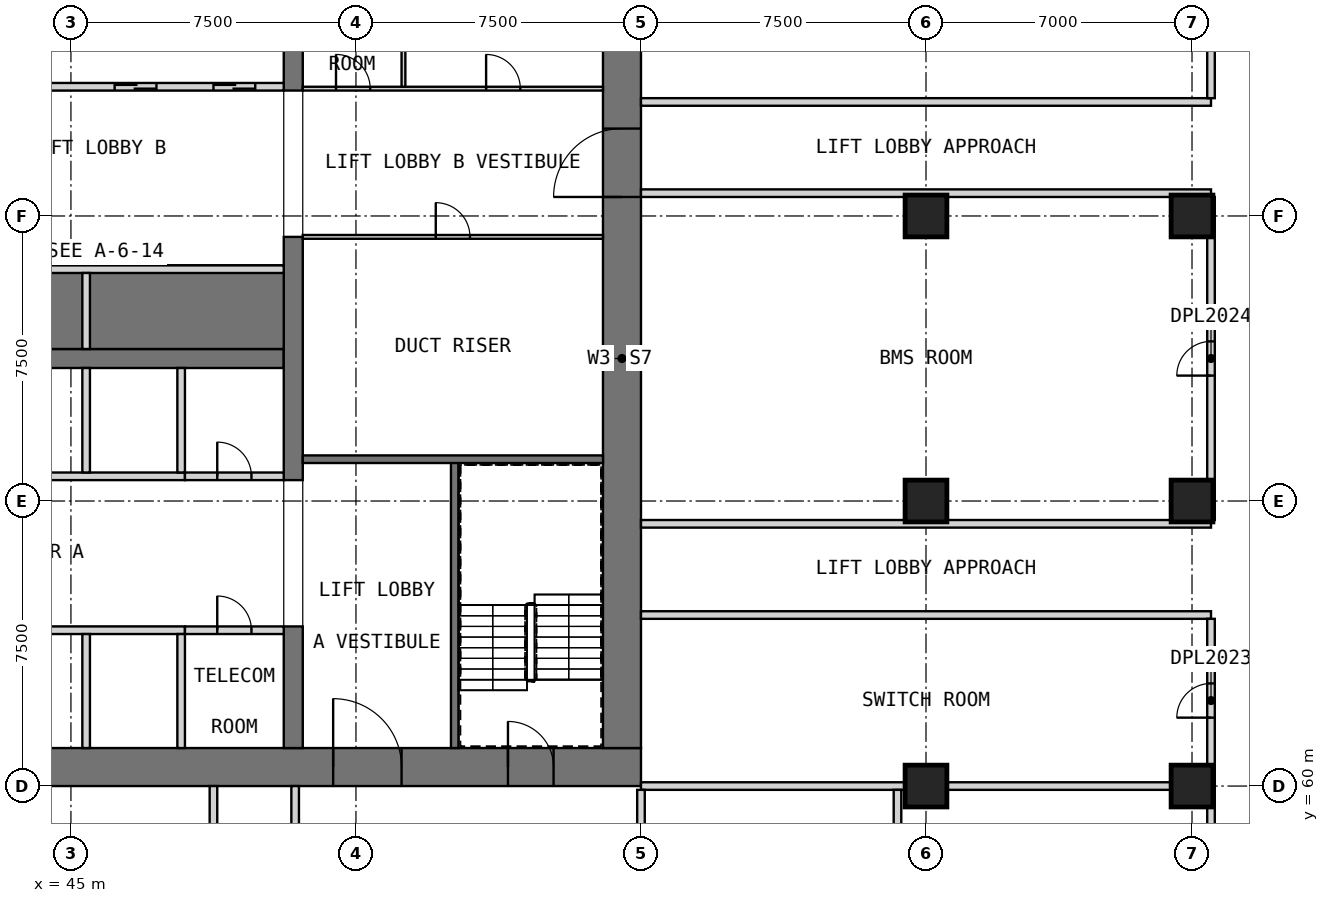
"""IFC4 building model, lengths in metres.
Left out: names, types, materials, properties, quantities, classifications, styles, units other than length and angle.
Written with IfcOpenShell. Run it as: python <this file> out.ifc"""

import sys

from ifc_helpers import new_model, si_unit, direction, frame, frame_2d, origin, origin_2d, place, context, subcontext, project, spatial, rectangle, extrude, element, fill, save


model = new_model("IFC4")
c1 = context("Model", 3, precision=1e-05, world=origin(), true_north=direction((0.0, 1.0)))
c2 = subcontext(c1, "Body", "Model", "MODEL_VIEW")
j1 = project(units=[si_unit("LENGTHUNIT", "METRE"), si_unit("PLANEANGLEUNIT", "RADIAN")], contexts=[c1])
p1 = place(None, origin())
s1 = spatial("IfcSite", under=j1, at=p1, CompositionType="ELEMENT")
p2 = place(p1, origin())
s2 = spatial("IfcBuilding", under=s1, at=p2, CompositionType="ELEMENT")
p3 = place(p2, frame((0.0, 0.0, 118.7)))
s3 = spatial("IfcBuildingStorey", under=s2, at=p3, CompositionType="ELEMENT", Elevation=118.7)
for number, where, z_axis, x_axis in (
    (1, (67.5, 60.0, 0.0), (0.0, 0.0, 1.0), (1.0, 0.0, 0.0)),
    (2, (67.5, 67.5, 0.0), (0.0, 0.0, 1.0), (1.0, 0.0, 0.0)),
    (3, (67.5, 75.0, 0.0), (0.0, 0.0, 1.0), (1.0, 0.0, 0.0)),
    (4, (74.5, 60.0, 0.0), (0.0, 0.0, 1.0), (1.0, 0.0, 0.0)),
    (5, (74.5, 67.5, 0.0), (0.0, 0.0, 1.0), (1.0, 0.0, 0.0)),
    (6, (74.5, 75.0, 0.0), (0.0, 0.0, 1.0), (1.0, 0.0, 0.0)),
):
    element("IfcColumn", number, at=place(p3, frame(where, z_axis=z_axis, x_axis=x_axis)), inside=s3, PredefinedType="COLUMN", context=c2, shape_type="SweptSolid", body=[
        extrude(rectangle(XDim=1.1, YDim=1.1, at=origin_2d()), origin(), (0.0, 0.0, 1.0), 5.5),
    ])
p4 = place(p3, frame((30.0, 60.5, 0.0), z_axis=(0.0, 0.0, 1.0), x_axis=(1.0, 0.0, 0.0)))
e7 = element("IfcWall", 7, at=p4, inside=s3, PredefinedType="SHEAR", context=c2, shape_type="SweptSolid", body=[
    extrude(rectangle(XDim=30.0, YDim=1.0, at=frame_2d((15.0, 0.0))), origin(), (0.0, 0.0, 1.0), 5.5),
])
p5 = place(p4, frame((21.9, 0.0, 0.0)))
e8 = element("IfcOpeningElement", 8, at=p5, cuts=e7, PredefinedType="OPENING", context=c2, shape_type="SweptSolid", body=[
    extrude(rectangle(XDim=1.8, YDim=2.1, at=frame_2d((0.9, 1.05))), frame((0.0, 0.51, 0.0), z_axis=(0.0, -1.0, 0.0), x_axis=(1.0, 0.0, 0.0)), (0.0, 0.0, 1.0), 1.02),
])
p6 = place(p4, frame((26.5, 0.0, 0.0)))
e9 = element("IfcOpeningElement", 9, at=p6, cuts=e7, PredefinedType="OPENING", context=c2, shape_type="SweptSolid", body=[
    extrude(rectangle(XDim=1.2, YDim=2.1, at=frame_2d((0.6, 1.05))), frame((0.0, 0.51, 0.0), z_axis=(0.0, -1.0, 0.0), x_axis=(1.0, 0.0, 0.0)), (0.0, 0.0, 1.0), 1.02),
])
p7 = place(p3, frame((59.5, 61.0, 0.0), z_axis=(0.0, 0.0, 1.0), x_axis=(0.0, 1.0, 0.0)))
e10 = element("IfcWall", 10, at=p7, inside=s3, PredefinedType="SHEAR", context=c2, shape_type="SweptSolid", body=[
    extrude(rectangle(XDim=20.5, YDim=1.0, at=frame_2d((10.25, 0.0))), origin(), (0.0, 0.0, 1.0), 5.5),
])
p8 = place(p7, frame((14.5, 0.0, 0.0)))
e11 = element("IfcOpeningElement", 11, at=p8, cuts=e10, PredefinedType="OPENING", context=c2, shape_type="SweptSolid", body=[
    extrude(rectangle(XDim=1.8, YDim=2.1, at=frame_2d((0.9, 1.05))), frame((0.0, 0.51, 0.0), z_axis=(0.0, -1.0, 0.0), x_axis=(1.0, 0.0, 0.0)), (0.0, 0.0, 1.0), 1.02),
])
p9 = place(p3, frame((35.0, 71.25, 0.0), z_axis=(0.0, 0.0, 1.0), x_axis=(1.0, 0.0, 0.0)))
e12 = element("IfcWall", 12, at=p9, inside=s3, PredefinedType="SHEAR", context=c2, shape_type="SweptSolid", body=[
    extrude(rectangle(XDim=15.6, YDim=0.5, at=frame_2d((7.8, 0.0))), origin(), (0.0, 0.0, 1.0), 5.5),
])
p10 = place(p3, frame((50.85, 61.0, 0.0), z_axis=(0.0, 0.0, 1.0), x_axis=(0.0, 1.0, 0.0)))
e13 = element("IfcWall", 13, at=p10, inside=s3, PredefinedType="SHEAR", context=c2, shape_type="SweptSolid", body=[
    extrude(rectangle(XDim=3.2, YDim=0.5, at=frame_2d((1.6, 0.0))), origin(), (0.0, 0.0, 1.0), 5.5),
])
p11 = place(p3, frame((50.85, 68.05, 0.0), z_axis=(0.0, 0.0, 1.0), x_axis=(0.0, 1.0, 0.0)))
e14 = element("IfcWall", 14, at=p11, inside=s3, PredefinedType="SHEAR", context=c2, shape_type="SweptSolid", body=[
    extrude(rectangle(XDim=6.4, YDim=0.5, at=frame_2d((3.2, 0.0))), origin(), (0.0, 0.0, 1.0), 5.5),
])
p12 = place(p3, frame((50.85, 78.3, 0.0), z_axis=(0.0, 0.0, 1.0), x_axis=(0.0, 1.0, 0.0)))
e15 = element("IfcWall", 15, at=p12, inside=s3, PredefinedType="SHEAR", context=c2, shape_type="SweptSolid", body=[
    extrude(rectangle(XDim=3.2, YDim=0.5, at=frame_2d((1.6, 0.0))), origin(), (0.0, 0.0, 1.0), 5.5),
])
p13 = place(p3, frame((35.0, 64.1, 0.0), z_axis=(0.0, 0.0, 1.0), x_axis=(1.0, 0.0, 0.0)))
e16 = element("IfcWall", 16, at=p13, inside=s3, PredefinedType="SOLIDWALL", context=c2, shape_type="SweptSolid", body=[
    extrude(rectangle(XDim=13.0, YDim=0.2, at=frame_2d((6.5, 0.0))), origin(), (0.0, 0.0, 1.0), 5.5),
])
for number, where, z_axis, x_axis in (
    (17, (45.4, 61.0, 0.0), (0.0, 0.0, 1.0), (0.0, 1.0, 0.0)),
    (18, (47.9, 61.0, 0.0), (0.0, 0.0, 1.0), (0.0, 1.0, 0.0)),
):
    element("IfcWall", number, at=place(p3, frame(where, z_axis=z_axis, x_axis=x_axis)), inside=s3, PredefinedType="SOLIDWALL", context=c2, shape_type="SweptSolid", body=[
        extrude(rectangle(XDim=3.0, YDim=0.2, at=frame_2d((1.5, 0.0))), origin(), (0.0, 0.0, 1.0), 5.5),
    ])
p14 = place(p3, frame((48.0, 64.1, 0.0), z_axis=(0.0, 0.0, 1.0), x_axis=(1.0, 0.0, 0.0)))
e19 = element("IfcWall", 19, at=p14, inside=s3, PredefinedType="PARTITIONING", context=c2, shape_type="SweptSolid", body=[
    extrude(rectangle(XDim=2.6, YDim=0.2, at=frame_2d((1.3, 0.0))), origin(), (0.0, 0.0, 1.0), 5.2),
])
p15 = place(p14, frame((0.85, 0.0, 0.0)))
e20 = element("IfcOpeningElement", 20, at=p15, cuts=e19, PredefinedType="OPENING", context=c2, shape_type="SweptSolid", body=[
    extrude(rectangle(XDim=0.9, YDim=2.1, at=frame_2d((0.45, 1.05))), frame((0.0, 0.11, 0.0), z_axis=(0.0, -1.0, 0.0), x_axis=(1.0, 0.0, 0.0)), (0.0, 0.0, 1.0), 0.22),
])
p16 = place(p3, frame((35.0, 68.15, 0.0), z_axis=(0.0, 0.0, 1.0), x_axis=(1.0, 0.0, 0.0)))
e21 = element("IfcWall", 21, at=p16, inside=s3, PredefinedType="SOLIDWALL", context=c2, shape_type="SweptSolid", body=[
    extrude(rectangle(XDim=13.0, YDim=0.2, at=frame_2d((6.5, 0.0))), origin(), (0.0, 0.0, 1.0), 5.5),
])
for number, where, z_axis, x_axis in (
    (22, (45.4, 68.25, 0.0), (0.0, 0.0, 1.0), (0.0, 1.0, 0.0)),
    (23, (47.9, 68.25, 0.0), (0.0, 0.0, 1.0), (0.0, 1.0, 0.0)),
):
    element("IfcWall", number, at=place(p3, frame(where, z_axis=z_axis, x_axis=x_axis)), inside=s3, PredefinedType="SOLIDWALL", context=c2, shape_type="SweptSolid", body=[
        extrude(rectangle(XDim=2.75, YDim=0.2, at=frame_2d((1.375, 0.0))), origin(), (0.0, 0.0, 1.0), 5.5),
    ])
p17 = place(p3, frame((48.0, 68.15, 0.0), z_axis=(0.0, 0.0, 1.0), x_axis=(1.0, 0.0, 0.0)))
e24 = element("IfcWall", 24, at=p17, inside=s3, PredefinedType="PARTITIONING", context=c2, shape_type="SweptSolid", body=[
    extrude(rectangle(XDim=2.6, YDim=0.2, at=frame_2d((1.3, 0.0))), origin(), (0.0, 0.0, 1.0), 5.2),
])
p18 = place(p17, frame((0.85, 0.0, 0.0)))
e25 = element("IfcOpeningElement", 25, at=p18, cuts=e24, PredefinedType="OPENING", context=c2, shape_type="SweptSolid", body=[
    extrude(rectangle(XDim=0.9, YDim=2.1, at=frame_2d((0.45, 1.05))), frame((0.0, 0.11, 0.0), z_axis=(0.0, -1.0, 0.0), x_axis=(1.0, 0.0, 0.0)), (0.0, 0.0, 1.0), 0.22),
])
p19 = place(p3, frame((35.0, 72.6, 0.0), z_axis=(0.0, 0.0, 1.0), x_axis=(1.0, 0.0, 0.0)))
e26 = element("IfcWall", 26, at=p19, inside=s3, PredefinedType="SOLIDWALL", context=c2, shape_type="SweptSolid", body=[
    extrude(rectangle(XDim=15.6, YDim=2.2, at=frame_2d((7.8, 0.0))), origin(), (0.0, 0.0, 1.0), 3.9),
])
p20 = place(p3, frame((35.0, 73.6, 3.9), z_axis=(0.0, 0.0, 1.0), x_axis=(1.0, 0.0, 0.0)))
e27 = element("IfcWall", 27, at=p20, inside=s3, PredefinedType="SOLIDWALL", context=c2, shape_type="SweptSolid", body=[
    extrude(rectangle(XDim=15.6, YDim=0.2, at=frame_2d((7.8, 0.0))), origin(), (0.0, 0.0, 1.0), 1.6),
])
p21 = place(p3, frame((45.4, 71.5, 3.9), z_axis=(0.0, 0.0, 1.0), x_axis=(0.0, 1.0, 0.0)))
e28 = element("IfcWall", 28, at=p21, inside=s3, PredefinedType="SOLIDWALL", context=c2, shape_type="SweptSolid", body=[
    extrude(rectangle(XDim=2.0, YDim=0.2, at=frame_2d((1.0, 0.0))), origin(), (0.0, 0.0, 1.0), 1.6),
])
p22 = place(p3, frame((35.0, 78.4, 0.0), z_axis=(0.0, 0.0, 1.0), x_axis=(1.0, 0.0, 0.0)))
e29 = element("IfcWall", 29, at=p22, inside=s3, PredefinedType="SOLIDWALL", context=c2, shape_type="SweptSolid", body=[
    extrude(rectangle(XDim=15.6, YDim=0.2, at=frame_2d((7.8, 0.0))), origin(), (0.0, 0.0, 1.0), 5.5),
])
p23 = place(p22, frame((0.75, 0.0, 0.0)))
e30 = element("IfcOpeningElement", 30, at=p23, cuts=e29, PredefinedType="OPENING", context=c2, shape_type="SweptSolid", body=[
    extrude(rectangle(XDim=1.1, YDim=2.1, at=frame_2d((0.55, 1.05))), frame((0.0, 0.11, 0.0), z_axis=(0.0, -1.0, 0.0), x_axis=(1.0, 0.0, 0.0)), (0.0, 0.0, 1.0), 0.22),
])
p24 = place(p22, frame((3.35, 0.0, 0.0)))
e31 = element("IfcOpeningElement", 31, at=p24, cuts=e29, PredefinedType="OPENING", context=c2, shape_type="SweptSolid", body=[
    extrude(rectangle(XDim=1.1, YDim=2.1, at=frame_2d((0.55, 1.05))), frame((0.0, 0.11, 0.0), z_axis=(0.0, -1.0, 0.0), x_axis=(1.0, 0.0, 0.0)), (0.0, 0.0, 1.0), 0.22),
])
p25 = place(p22, frame((11.15, 0.0, 0.0)))
e32 = element("IfcOpeningElement", 32, at=p25, cuts=e29, PredefinedType="OPENING", context=c2, shape_type="SweptSolid", body=[
    extrude(rectangle(XDim=1.1, YDim=2.1, at=frame_2d((0.55, 1.05))), frame((0.0, 0.11, 0.0), z_axis=(0.0, -1.0, 0.0), x_axis=(1.0, 0.0, 0.0)), (0.0, 0.0, 1.0), 0.22),
])
p26 = place(p22, frame((13.75, 0.0, 0.0)))
e33 = element("IfcOpeningElement", 33, at=p26, cuts=e29, PredefinedType="OPENING", context=c2, shape_type="SweptSolid", body=[
    extrude(rectangle(XDim=1.1, YDim=2.1, at=frame_2d((0.55, 1.05))), frame((0.0, 0.11, 0.0), z_axis=(0.0, -1.0, 0.0), x_axis=(1.0, 0.0, 0.0)), (0.0, 0.0, 1.0), 0.22),
])
p27 = place(p3, frame((55.1, 61.0, 0.0), z_axis=(0.0, 0.0, 1.0), x_axis=(0.0, 1.0, 0.0)))
e34 = element("IfcWall", 34, at=p27, inside=s3, PredefinedType="SOLIDWALL", context=c2, shape_type="SweptSolid", body=[
    extrude(rectangle(XDim=7.6, YDim=0.2, at=frame_2d((3.8, 0.0))), origin(), (0.0, 0.0, 1.0), 5.2),
])
p28 = place(p3, frame((51.1, 68.6, 0.0), z_axis=(0.0, 0.0, 1.0), x_axis=(1.0, 0.0, 0.0)))
e35 = element("IfcWall", 35, at=p28, inside=s3, PredefinedType="SOLIDWALL", context=c2, shape_type="SweptSolid", body=[
    extrude(rectangle(XDim=7.9, YDim=0.2, at=frame_2d((3.95, 0.0))), origin(), (0.0, 0.0, 1.0), 5.2),
])
p29 = place(p3, frame((51.1, 74.45, 0.0), z_axis=(0.0, 0.0, 1.0), x_axis=(1.0, 0.0, 0.0)))
e36 = element("IfcWall", 36, at=p29, inside=s3, PredefinedType="PARTITIONING", context=c2, shape_type="SweptSolid", body=[
    extrude(rectangle(XDim=7.9, YDim=0.1, at=frame_2d((3.95, 0.0))), origin(), (0.0, 0.0, 1.0), 5.2),
])
p30 = place(p29, frame((3.5, 0.0, 0.0)))
e37 = element("IfcOpeningElement", 37, at=p30, cuts=e36, PredefinedType="OPENING", context=c2, shape_type="SweptSolid", body=[
    extrude(rectangle(XDim=0.9, YDim=2.1, at=frame_2d((0.45, 1.05))), frame((0.0, 0.06, 0.0), z_axis=(0.0, -1.0, 0.0), x_axis=(1.0, 0.0, 0.0)), (0.0, 0.0, 1.0), 0.12),
])
p31 = place(p3, frame((51.1, 78.35, 0.0), z_axis=(0.0, 0.0, 1.0), x_axis=(1.0, 0.0, 0.0)))
e38 = element("IfcWall", 38, at=p31, inside=s3, PredefinedType="PARTITIONING", context=c2, shape_type="SweptSolid", body=[
    extrude(rectangle(XDim=7.9, YDim=0.1, at=frame_2d((3.95, 0.0))), origin(), (0.0, 0.0, 1.0), 5.2),
])
p32 = place(p31, frame((0.875, 0.0, 0.0)))
e39 = element("IfcOpeningElement", 39, at=p32, cuts=e38, PredefinedType="OPENING", context=c2, shape_type="SweptSolid", body=[
    extrude(rectangle(XDim=0.9, YDim=2.1, at=frame_2d((0.45, 1.05))), frame((0.0, 0.06, 0.0), z_axis=(0.0, -1.0, 0.0), x_axis=(1.0, 0.0, 0.0)), (0.0, 0.0, 1.0), 0.12),
])
p33 = place(p31, frame((4.825, 0.0, 0.0)))
e40 = element("IfcOpeningElement", 40, at=p33, cuts=e38, PredefinedType="OPENING", context=c2, shape_type="SweptSolid", body=[
    extrude(rectangle(XDim=0.9, YDim=2.1, at=frame_2d((0.45, 1.05))), frame((0.0, 0.06, 0.0), z_axis=(0.0, -1.0, 0.0), x_axis=(1.0, 0.0, 0.0)), (0.0, 0.0, 1.0), 0.12),
])
p34 = place(p3, frame((53.75, 78.4, 0.0), z_axis=(0.0, 0.0, 1.0), x_axis=(0.0, 1.0, 0.0)))
e41 = element("IfcWall", 41, at=p34, inside=s3, PredefinedType="PARTITIONING", context=c2, shape_type="SweptSolid", body=[
    extrude(rectangle(XDim=3.1, YDim=0.1, at=frame_2d((1.55, 0.0))), origin(), (0.0, 0.0, 1.0), 5.2),
])
p35 = place(p3, frame((60.0, 60.0, 0.0), z_axis=(0.0, 0.0, 1.0), x_axis=(1.0, 0.0, 0.0)))
e42 = element("IfcWall", 42, at=p35, inside=s3, PredefinedType="PARTITIONING", context=c2, shape_type="SweptSolid", body=[
    extrude(rectangle(XDim=14.9, YDim=0.2, at=frame_2d((7.45, 0.0))), origin(), (0.0, 0.0, 1.0), 5.2),
])
for number, where, z_axis, x_axis in (
    (43, (60.0, 64.5, 0.0), (0.0, 0.0, 1.0), (1.0, 0.0, 0.0)),
    (44, (60.0, 66.9, 0.0), (0.0, 0.0, 1.0), (1.0, 0.0, 0.0)),
    (45, (60.0, 75.6, 0.0), (0.0, 0.0, 1.0), (1.0, 0.0, 0.0)),
    (46, (60.0, 78.0, 0.0), (0.0, 0.0, 1.0), (1.0, 0.0, 0.0)),
):
    element("IfcWall", number, at=place(p3, frame(where, z_axis=z_axis, x_axis=x_axis)), inside=s3, PredefinedType="PARTITIONING", context=c2, shape_type="SweptSolid", body=[
        extrude(rectangle(XDim=15.0, YDim=0.2, at=frame_2d((7.5, 0.0))), origin(), (0.0, 0.0, 1.0), 5.2),
    ])
for number, where, z_axis, x_axis in (
    (47, (48.75, 52.6, 0.0), (0.0, 0.0, 1.0), (0.0, 1.0, 0.0)),
    (48, (50.9, 52.6, 0.0), (0.0, 0.0, 1.0), (0.0, 1.0, 0.0)),
):
    element("IfcWall", number, at=place(p3, frame(where, z_axis=z_axis, x_axis=x_axis)), inside=s3, PredefinedType="PARTITIONING", context=c2, shape_type="SweptSolid", body=[
        extrude(rectangle(XDim=7.4, YDim=0.2, at=frame_2d((3.7, 0.0))), origin(), (0.0, 0.0, 1.0), 5.2),
    ])
for number, where, z_axis, x_axis in (
    (49, (60.0, 52.6, 0.0), (0.0, 0.0, 1.0), (0.0, 1.0, 0.0)),
    (50, (66.75, 52.6, 0.0), (0.0, 0.0, 1.0), (0.0, 1.0, 0.0)),
):
    element("IfcWall", number, at=place(p3, frame(where, z_axis=z_axis, x_axis=x_axis)), inside=s3, PredefinedType="PARTITIONING", context=c2, shape_type="SweptSolid", body=[
        extrude(rectangle(XDim=7.3, YDim=0.2, at=frame_2d((3.65, 0.0))), origin(), (0.0, 0.0, 1.0), 5.2),
    ])
p36 = place(p3, frame((75.0, 52.6, 0.0), z_axis=(0.0, 0.0, 1.0), x_axis=(0.0, 1.0, 0.0)))
e51 = element("IfcWall", 51, at=p36, inside=s3, PredefinedType="PARTITIONING", context=c2, shape_type="SweptSolid", body=[
    extrude(rectangle(XDim=11.8, YDim=0.2, at=frame_2d((5.9, 0.0))), origin(), (0.0, 0.0, 1.0), 5.2),
])
p37 = place(p36, frame((9.2, 0.0, 0.0)))
e52 = element("IfcOpeningElement", 52, at=p37, cuts=e51, PredefinedType="OPENING", context=c2, shape_type="SweptSolid", body=[
    extrude(rectangle(XDim=0.9, YDim=2.1, at=frame_2d((0.45, 1.05))), frame((0.0, 0.11, 0.0), z_axis=(0.0, -1.0, 0.0), x_axis=(1.0, 0.0, 0.0)), (0.0, 0.0, 1.0), 0.22),
])
p38 = place(p3, frame((75.0, 67.0, 0.0), z_axis=(0.0, 0.0, 1.0), x_axis=(0.0, 1.0, 0.0)))
e53 = element("IfcWall", 53, at=p38, inside=s3, PredefinedType="PARTITIONING", context=c2, shape_type="SweptSolid", body=[
    extrude(rectangle(XDim=8.5, YDim=0.2, at=frame_2d((4.25, 0.0))), origin(), (0.0, 0.0, 1.0), 5.2),
])
p39 = place(p38, frame((3.8, 0.0, 0.0)))
e54 = element("IfcOpeningElement", 54, at=p39, cuts=e53, PredefinedType="OPENING", context=c2, shape_type="SweptSolid", body=[
    extrude(rectangle(XDim=0.9, YDim=2.1, at=frame_2d((0.45, 1.05))), frame((0.0, 0.11, 0.0), z_axis=(0.0, -1.0, 0.0), x_axis=(1.0, 0.0, 0.0)), (0.0, 0.0, 1.0), 0.22),
])
p40 = place(p3, frame((75.0, 78.1, 0.0), z_axis=(0.0, 0.0, 1.0), x_axis=(0.0, 1.0, 0.0)))
e55 = element("IfcWall", 55, at=p40, inside=s3, PredefinedType="PARTITIONING", context=c2, shape_type="SweptSolid", body=[
    extrude(rectangle(XDim=11.8, YDim=0.2, at=frame_2d((5.9, 0.0))), origin(), (0.0, 0.0, 1.0), 5.2),
])
p41 = place(p40, frame((7.7, 0.0, 0.0)))
e56 = element("IfcOpeningElement", 56, at=p41, cuts=e55, PredefinedType="OPENING", context=c2, shape_type="SweptSolid", body=[
    extrude(rectangle(XDim=0.9, YDim=2.1, at=frame_2d((0.45, 1.05))), frame((0.0, 0.11, 0.0), z_axis=(0.0, -1.0, 0.0), x_axis=(1.0, 0.0, 0.0)), (0.0, 0.0, 1.0), 0.22),
])
p42 = place(p40, frame((1.7, 0.0, 0.0)))
e57 = element("IfcOpeningElement", 57, at=p42, cuts=e55, PredefinedType="OPENING", context=c2, shape_type="SweptSolid", body=[
    extrude(rectangle(XDim=0.9, YDim=2.1, at=frame_2d((0.45, 1.05))), frame((0.0, 0.11, 0.0), z_axis=(0.0, -1.0, 0.0), x_axis=(1.0, 0.0, 0.0)), (0.0, 0.0, 1.0), 0.22),
])
p43 = place(p15, origin())
e58 = element("IfcDoor", 58, at=p43, inside=s3, OperationType="SINGLE_SWING_LEFT", PredefinedType="DOOR", context=c2, shape_type="SweptSolid", body=[
    extrude(rectangle(XDim=0.9, YDim=2.1, at=frame_2d((0.45, 1.05))), frame((0.0, 0.025, 0.0), z_axis=(0.0, -1.0, 0.0), x_axis=(1.0, 0.0, 0.0)), (0.0, 0.0, 1.0), 0.05),
])
fill(e20, e58)
p44 = place(p18, origin())
e59 = element("IfcDoor", 59, at=p44, inside=s3, OperationType="SINGLE_SWING_LEFT", PredefinedType="DOOR", context=c2, shape_type="SweptSolid", body=[
    extrude(rectangle(XDim=0.9, YDim=2.1, at=frame_2d((0.45, 1.05))), frame((0.0, 0.025, 0.0), z_axis=(0.0, -1.0, 0.0), x_axis=(1.0, 0.0, 0.0)), (0.0, 0.0, 1.0), 0.05),
])
fill(e25, e59)
p45 = place(p25, origin())
e60 = element("IfcDoor", 60, at=p45, inside=s3, OperationType="DOUBLE_DOOR_SLIDING", PredefinedType="DOOR", context=c2, shape_type="SweptSolid", body=[
    extrude(rectangle(XDim=1.1, YDim=2.1, at=frame_2d((0.55, 1.05))), frame((0.0, 0.025, 0.0), z_axis=(0.0, -1.0, 0.0), x_axis=(1.0, 0.0, 0.0)), (0.0, 0.0, 1.0), 0.05),
])
fill(e32, e60)
p46 = place(p26, origin())
e61 = element("IfcDoor", 61, at=p46, inside=s3, OperationType="DOUBLE_DOOR_SLIDING", PredefinedType="DOOR", context=c2, shape_type="SweptSolid", body=[
    extrude(rectangle(XDim=1.1, YDim=2.1, at=frame_2d((0.55, 1.05))), frame((0.0, 0.025, 0.0), z_axis=(0.0, -1.0, 0.0), x_axis=(1.0, 0.0, 0.0)), (0.0, 0.0, 1.0), 0.05),
])
fill(e33, e61)
p47 = place(p5, origin())
e62 = element("IfcDoor", 62, at=p47, inside=s3, OperationType="DOUBLE_DOOR_SINGLE_SWING", PredefinedType="DOOR", context=c2, shape_type="SweptSolid", body=[
    extrude(rectangle(XDim=1.8, YDim=2.1, at=frame_2d((0.9, 1.05))), frame((0.0, 0.025, 0.0), z_axis=(0.0, -1.0, 0.0), x_axis=(1.0, 0.0, 0.0)), (0.0, 0.0, 1.0), 0.05),
])
fill(e8, e62)
p48 = place(p8, origin())
e63 = element("IfcDoor", 63, at=p48, inside=s3, OperationType="DOUBLE_DOOR_SINGLE_SWING", PredefinedType="DOOR", context=c2, shape_type="SweptSolid", body=[
    extrude(rectangle(XDim=1.8, YDim=2.1, at=frame_2d((0.9, 1.05))), frame((0.0, 0.025, 0.0), z_axis=(0.0, -1.0, 0.0), x_axis=(1.0, 0.0, 0.0)), (0.0, 0.0, 1.0), 0.05),
])
fill(e11, e63)
p49 = place(p6, origin())
e64 = element("IfcDoor", 64, at=p49, inside=s3, OperationType="SINGLE_SWING_LEFT", PredefinedType="DOOR", context=c2, shape_type="SweptSolid", body=[
    extrude(rectangle(XDim=1.2, YDim=2.1, at=frame_2d((0.6, 1.05))), frame((0.0, 0.025, 0.0), z_axis=(0.0, -1.0, 0.0), x_axis=(1.0, 0.0, 0.0)), (0.0, 0.0, 1.0), 0.05),
])
fill(e9, e64)
p50 = place(p30, origin())
e65 = element("IfcDoor", 65, at=p50, inside=s3, OperationType="SINGLE_SWING_LEFT", PredefinedType="DOOR", context=c2, shape_type="SweptSolid", body=[
    extrude(rectangle(XDim=0.9, YDim=2.1, at=frame_2d((0.45, 1.05))), frame((0.0, 0.025, 0.0), z_axis=(0.0, -1.0, 0.0), x_axis=(1.0, 0.0, 0.0)), (0.0, 0.0, 1.0), 0.05),
])
fill(e37, e65)
p51 = place(p32, origin())
e66 = element("IfcDoor", 66, at=p51, inside=s3, OperationType="SINGLE_SWING_LEFT", PredefinedType="DOOR", context=c2, shape_type="SweptSolid", body=[
    extrude(rectangle(XDim=0.9, YDim=2.1, at=frame_2d((0.45, 1.05))), frame((0.0, 0.025, 0.0), z_axis=(0.0, -1.0, 0.0), x_axis=(1.0, 0.0, 0.0)), (0.0, 0.0, 1.0), 0.05),
])
fill(e39, e66)
p52 = place(p33, origin())
e67 = element("IfcDoor", 67, at=p52, inside=s3, OperationType="SINGLE_SWING_RIGHT", PredefinedType="DOOR", context=c2, shape_type="SweptSolid", body=[
    extrude(rectangle(XDim=0.9, YDim=2.1, at=frame_2d((0.45, 1.05))), frame((0.0, 0.025, 0.0), z_axis=(0.0, -1.0, 0.0), x_axis=(1.0, 0.0, 0.0)), (0.0, 0.0, 1.0), 0.05),
])
fill(e40, e67)
p53 = place(p37, origin())
e68 = element("IfcDoor", 68, at=p53, inside=s3, OperationType="SINGLE_SWING_LEFT", PredefinedType="DOOR", context=c2, shape_type="SweptSolid", body=[
    extrude(rectangle(XDim=0.9, YDim=2.1, at=frame_2d((0.45, 1.05))), frame((0.0, 0.025, 0.0), z_axis=(0.0, -1.0, 0.0), x_axis=(1.0, 0.0, 0.0)), (0.0, 0.0, 1.0), 0.05),
])
fill(e52, e68)
p54 = place(p39, origin())
e69 = element("IfcDoor", 69, at=p54, inside=s3, OperationType="SINGLE_SWING_LEFT", PredefinedType="DOOR", context=c2, shape_type="SweptSolid", body=[
    extrude(rectangle(XDim=0.9, YDim=2.1, at=frame_2d((0.45, 1.05))), frame((0.0, 0.025, 0.0), z_axis=(0.0, -1.0, 0.0), x_axis=(1.0, 0.0, 0.0)), (0.0, 0.0, 1.0), 0.05),
])
fill(e54, e69)
save(model, sys.argv[1])
